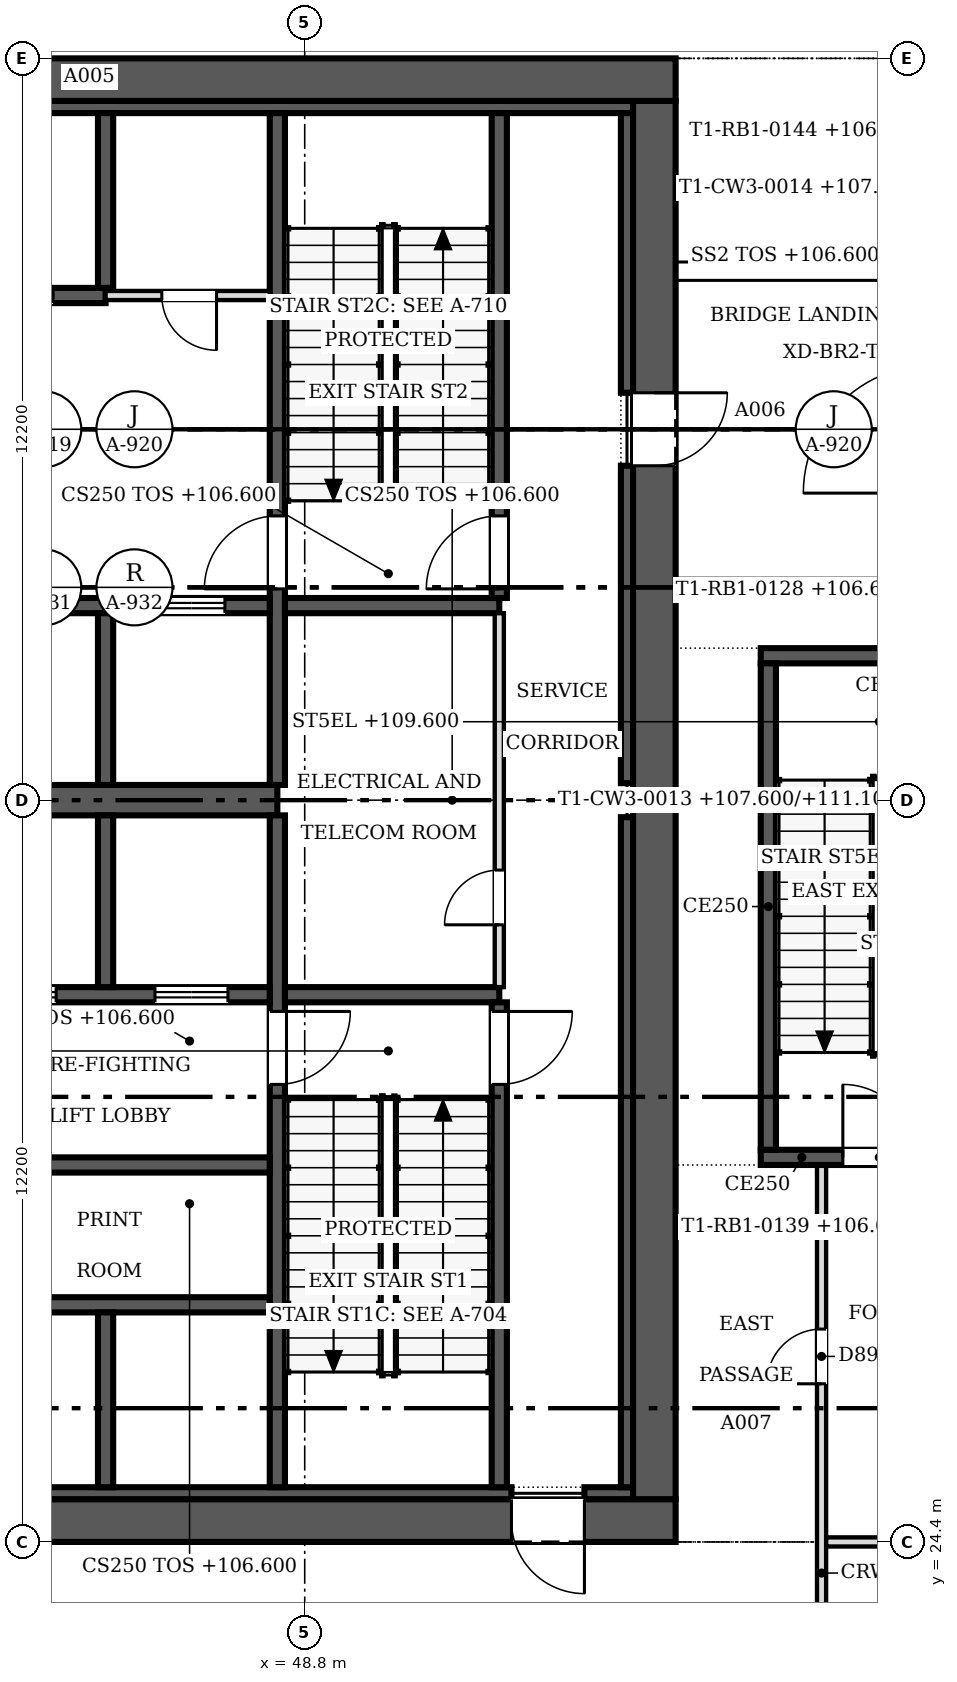
"""IFC4 building model, lengths in metres.
Left out: names, types, materials, properties, quantities, classifications, styles, units other than length and angle.
Written with IfcOpenShell. Run it as: python <this file> out.ifc"""

import sys

from ifc_helpers import new_model, si_unit, direction, frame, frame_2d, origin, place, context, subcontext, project, spatial, rectangle, extrude, source, transform, mapped, element, fill, save


model = new_model("IFC4")
c1 = context("Model", 3, precision=1e-05, world=origin(), true_north=direction((0.0, 1.0)))
c2 = subcontext(c1, "Body", "Model", "MODEL_VIEW")
j1 = project(units=[si_unit("LENGTHUNIT", "METRE"), si_unit("PLANEANGLEUNIT", "RADIAN")], contexts=[c1])
p1 = place(None, origin())
s1 = spatial("IfcSite", under=j1, at=p1, CompositionType="ELEMENT")
p2 = place(p1, origin())
s2 = spatial("IfcBuilding", under=s1, at=p2, CompositionType="ELEMENT")
p3 = place(p2, frame((0.0, 0.0, 106.6)))
s3 = spatial("IfcBuildingStorey", under=s2, at=p3, CompositionType="ELEMENT", Elevation=106.6)
p4 = place(p3, frame((54.9, 24.75, 0.0), z_axis=(0.0, 0.0, 1.0), x_axis=(-1.0, 0.0, 0.0)))
e1 = element("IfcWall", 1, at=p4, inside=s3, PredefinedType="SHEAR", context=c2, shape_type="SweptSolid", body=[
    extrude(rectangle(XDim=24.4, YDim=0.7, at=frame_2d((12.2, 0.0))), origin(), (0.0, 0.0, 1.0), 6.0),
])
m1 = source(origin(), c2, "Body", "SweptSolid", [
    extrude(rectangle(XDim=1.2, YDim=2.1, at=frame_2d((0.6, 1.05))), frame((0.0, 0.36, 0.0), z_axis=(0.0, -1.0, 0.0), x_axis=(1.0, 0.0, 0.0)), (0.0, 0.0, 1.0), 0.72),
])
p5 = place(p4, frame((1.5, 0.0, 0.0)))
e2 = element("IfcOpeningElement", 2, at=p5, cuts=e1, PredefinedType="OPENING", context=c2, shape_type="MappedRepresentation", body=[
    mapped(m1, transform((0.0, 0.0, 0.0), scale=1.0)),
])
p6 = place(p3, frame((30.5, 48.45, 0.0), z_axis=(0.0, 0.0, 1.0), x_axis=(1.0, 0.0, 0.0)))
e3 = element("IfcWall", 3, at=p6, inside=s3, PredefinedType="SHEAR", context=c2, shape_type="SweptSolid", body=[
    extrude(rectangle(XDim=24.4, YDim=0.7, at=frame_2d((12.2, 0.0))), origin(), (0.0, 0.0, 1.0), 6.0),
])
p7 = place(p3, frame((54.55, 48.1, 0.0), z_axis=(0.0, 0.0, 1.0), x_axis=(0.0, -1.0, 0.0)))
e4 = element("IfcWall", 4, at=p7, inside=s3, PredefinedType="SHEAR", context=c2, shape_type="SweptSolid", body=[
    extrude(rectangle(XDim=23.0, YDim=0.7, at=frame_2d((11.5, 0.0))), origin(), (0.0, 0.0, 1.0), 6.0),
])
p8 = place(p7, frame((4.8, 0.0, 0.0)))
e5 = element("IfcOpeningElement", 5, at=p8, cuts=e4, PredefinedType="OPENING", context=c2, shape_type="MappedRepresentation", body=[
    mapped(m1, transform((0.0, 0.0, 0.0), scale=1.0)),
])
p9 = place(p3, frame((31.2, 25.2, 0.0), z_axis=(0.0, 0.0, 1.0), x_axis=(1.0, 0.0, 0.0)))
e6 = element("IfcWall", 6, at=p9, inside=s3, PredefinedType="SOLIDWALL", context=c2, shape_type="SweptSolid", body=[
    extrude(rectangle(XDim=21.0, YDim=0.2, at=frame_2d((10.5, 0.0))), origin(), (0.0, 0.0, 1.0), 6.0),
])
p10 = place(p3, frame((53.4, 25.2, 0.0), z_axis=(0.0, 0.0, 1.0), x_axis=(1.0, 0.0, 0.0)))
e7 = element("IfcWall", 7, at=p10, inside=s3, PredefinedType="SOLIDWALL", context=c2, shape_type="SweptSolid", body=[
    extrude(rectangle(XDim=0.8, YDim=0.2, at=frame_2d((0.4, 0.0))), origin(), (0.0, 0.0, 1.0), 6.0),
])
p11 = place(p3, frame((31.2, 48.0, 0.0), z_axis=(0.0, 0.0, 1.0), x_axis=(1.0, 0.0, 0.0)))
e8 = element("IfcWall", 8, at=p11, inside=s3, PredefinedType="SOLIDWALL", context=c2, shape_type="SweptSolid", body=[
    extrude(rectangle(XDim=23.0, YDim=0.2, at=frame_2d((11.5, 0.0))), origin(), (0.0, 0.0, 1.0), 6.0),
])
p12 = place(p3, frame((54.1, 25.3, 0.0), z_axis=(0.0, 0.0, 1.0), x_axis=(0.0, 1.0, 0.0)))
e9 = element("IfcWall", 9, at=p12, inside=s3, PredefinedType="SOLIDWALL", context=c2, shape_type="SweptSolid", body=[
    extrude(rectangle(XDim=11.02, YDim=0.2, at=frame_2d((5.51, 0.0))), origin(), (0.0, 0.0, 1.0), 6.0),
])
p13 = place(p3, frame((54.1, 36.88, 0.0), z_axis=(0.0, 0.0, 1.0), x_axis=(0.0, 1.0, 0.0)))
e10 = element("IfcWall", 10, at=p13, inside=s3, PredefinedType="SOLIDWALL", context=c2, shape_type="SweptSolid", body=[
    extrude(rectangle(XDim=5.22, YDim=0.2, at=frame_2d((2.61, 0.0))), origin(), (0.0, 0.0, 1.0), 6.0),
])
p14 = place(p3, frame((54.1, 43.3, 0.0), z_axis=(0.0, 0.0, 1.0), x_axis=(0.0, 1.0, 0.0)))
e11 = element("IfcWall", 11, at=p14, inside=s3, PredefinedType="SOLIDWALL", context=c2, shape_type="SweptSolid", body=[
    extrude(rectangle(XDim=4.6, YDim=0.2, at=frame_2d((2.3, 0.0))), origin(), (0.0, 0.0, 1.0), 6.0),
])
p15 = place(p3, frame((31.4, 36.6, 0.0), z_axis=(0.0, 0.0, 1.0), x_axis=(1.0, 0.0, 0.0)))
e12 = element("IfcWall", 12, at=p15, inside=s3, PredefinedType="SHEAR", context=c2, shape_type="SweptSolid", body=[
    extrude(rectangle(XDim=16.95, YDim=0.5, at=frame_2d((8.475, 0.0))), origin(), (0.0, 0.0, 1.0), 6.0),
])
p16 = place(p3, frame((48.35, 36.35, 0.0), z_axis=(0.0, 0.0, 1.0), x_axis=(0.0, -1.0, 0.0)))
e13 = element("IfcWall", 13, at=p16, inside=s3, PredefinedType="SOLIDWALL", context=c2, shape_type="SweptSolid", body=[
    extrude(rectangle(XDim=11.05, YDim=0.25, at=frame_2d((5.525, 0.0))), origin(), (0.0, 0.0, 1.0), 6.0),
])
m2 = source(origin(), c2, "Body", "SweptSolid", [
    extrude(rectangle(XDim=1.2, YDim=2.1, at=frame_2d((0.6, 1.05))), frame((0.0, 0.135, 0.0), z_axis=(0.0, -1.0, 0.0), x_axis=(1.0, 0.0, 0.0)), (0.0, 0.0, 1.0), 0.27),
])
p17 = place(p16, frame((3.225, 0.0, 0.0)))
e14 = element("IfcOpeningElement", 14, at=p17, cuts=e13, PredefinedType="OPENING", context=c2, shape_type="MappedRepresentation", body=[
    mapped(m2, transform((0.0, 0.0, 0.0), scale=1.0)),
])
p18 = place(p3, frame((48.35, 47.9, 0.0), z_axis=(0.0, 0.0, 1.0), x_axis=(0.0, -1.0, 0.0)))
e15 = element("IfcWall", 15, at=p18, inside=s3, PredefinedType="SOLIDWALL", context=c2, shape_type="SweptSolid", body=[
    extrude(rectangle(XDim=11.05, YDim=0.25, at=frame_2d((5.525, 0.0))), origin(), (0.0, 0.0, 1.0), 6.0),
])
p19 = place(p18, frame((6.625, 0.0, 0.0)))
e16 = element("IfcOpeningElement", 16, at=p19, cuts=e15, PredefinedType="OPENING", context=c2, shape_type="MappedRepresentation", body=[
    mapped(m2, transform((0.0, 0.0, 0.0), scale=1.0)),
])
p20 = place(p3, frame((48.225, 33.4, 0.0), z_axis=(0.0, 0.0, 1.0), x_axis=(-1.0, 0.0, 0.0)))
e17 = element("IfcWall", 17, at=p20, inside=s3, PredefinedType="SOLIDWALL", context=c2, shape_type="SweptSolid", body=[
    extrude(rectangle(XDim=5.275, YDim=0.25, at=frame_2d((2.638, 0.0))), origin(), (0.0, 0.0, 1.0), 6.0),
])
p21 = place(p20, frame((3.512, 0.0, 0.0)))
e18 = element("IfcOpeningElement", 18, at=p21, cuts=e17, PredefinedType="OPENING", context=c2, shape_type="MappedRepresentation", body=[
    mapped(m2, transform((0.0, 0.0, 0.0), scale=1.0)),
])
p22 = place(p20, frame((0.688, 0.0, 0.0)))
e19 = element("IfcOpeningElement", 19, at=p22, cuts=e17, PredefinedType="OPENING", context=c2, shape_type="MappedRepresentation", body=[
    mapped(m2, transform((0.0, 0.0, 0.0), scale=1.0)),
])
p23 = place(p3, frame((48.475, 33.4, 0.0), z_axis=(0.0, 0.0, 1.0), x_axis=(1.0, 0.0, 0.0)))
e20 = element("IfcWall", 20, at=p23, inside=s3, PredefinedType="SOLIDWALL", context=c2, shape_type="SweptSolid", body=[
    extrude(rectangle(XDim=3.525, YDim=0.25, at=frame_2d((1.762, 0.0))), origin(), (0.0, 0.0, 1.0), 6.0),
])
p24 = place(p3, frame((42.95, 39.8, 0.0), z_axis=(0.0, 0.0, 1.0), x_axis=(1.0, 0.0, 0.0)))
e21 = element("IfcWall", 21, at=p24, inside=s3, PredefinedType="SOLIDWALL", context=c2, shape_type="SweptSolid", body=[
    extrude(rectangle(XDim=5.275, YDim=0.25, at=frame_2d((2.638, 0.0))), origin(), (0.0, 0.0, 1.0), 6.0),
])
m3 = source(origin(), c2, "Body", "SweptSolid", [
    extrude(rectangle(XDim=1.1, YDim=2.1, at=frame_2d((0.55, 1.05))), frame((0.0, 0.135, 0.0), z_axis=(0.0, -1.0, 0.0), x_axis=(1.0, 0.0, 0.0)), (0.0, 0.0, 1.0), 0.27),
])
p25 = place(p24, frame((0.613, 0.0, 0.0)))
e22 = element("IfcOpeningElement", 22, at=p25, cuts=e21, PredefinedType="OPENING", context=c2, shape_type="MappedRepresentation", body=[
    mapped(m3, transform((0.0, 0.0, 0.0), scale=1.0)),
])
p26 = place(p24, frame((3.438, 0.0, 0.0)))
e23 = element("IfcOpeningElement", 23, at=p26, cuts=e21, PredefinedType="OPENING", context=c2, shape_type="MappedRepresentation", body=[
    mapped(m3, transform((0.0, 0.0, 0.0), scale=1.0)),
])
p27 = place(p3, frame((48.475, 39.8, 0.0), z_axis=(0.0, 0.0, 1.0), x_axis=(1.0, 0.0, 0.0)))
e24 = element("IfcWall", 24, at=p27, inside=s3, PredefinedType="SOLIDWALL", context=c2, shape_type="SweptSolid", body=[
    extrude(rectangle(XDim=3.525, YDim=0.25, at=frame_2d((1.762, 0.0))), origin(), (0.0, 0.0, 1.0), 6.0),
])
p28 = place(p3, frame((42.95, 28.3, 0.0), z_axis=(0.0, 0.0, 1.0), x_axis=(1.0, 0.0, 0.0)))
e25 = element("IfcWall", 25, at=p28, inside=s3, PredefinedType="SOLIDWALL", context=c2, shape_type="SweptSolid", body=[
    extrude(rectangle(XDim=5.275, YDim=0.25, at=frame_2d((2.638, 0.0))), origin(), (0.0, 0.0, 1.0), 6.0),
])
p29 = place(p3, frame((45.525, 44.9, 0.0), z_axis=(0.0, 0.0, 1.0), x_axis=(-1.0, 0.0, 0.0)))
e26 = element("IfcWall", 26, at=p29, inside=s3, PredefinedType="SOLIDWALL", context=c2, shape_type="SweptSolid", body=[
    extrude(rectangle(XDim=2.575, YDim=0.25, at=frame_2d((1.288, 0.0))), origin(), (0.0, 0.0, 1.0), 6.0),
])
p30 = place(p29, frame((0.863, 0.0, 0.0)))
e27 = element("IfcOpeningElement", 27, at=p30, cuts=e26, PredefinedType="OPENING", context=c2, shape_type="MappedRepresentation", body=[
    mapped(m3, transform((0.0, 0.0, 0.0), scale=1.0)),
])
p31 = place(p3, frame((52.0, 25.3, 0.0), z_axis=(0.0, 0.0, 1.0), x_axis=(0.0, 1.0, 0.0)))
e28 = element("IfcWall", 28, at=p31, inside=s3, PredefinedType="SOLIDWALL", context=c2, shape_type="SweptSolid", body=[
    extrude(rectangle(XDim=7.975, YDim=0.25, at=frame_2d((3.987, 0.0))), origin(), (0.0, 0.0, 1.0), 6.0),
])
p32 = place(p31, frame((6.625, 0.0, 0.0)))
e29 = element("IfcOpeningElement", 29, at=p32, cuts=e28, PredefinedType="OPENING", context=c2, shape_type="MappedRepresentation", body=[
    mapped(m2, transform((0.0, 0.0, 0.0), scale=1.0)),
])
p33 = place(p3, frame((52.0, 39.925, 0.0), z_axis=(0.0, 0.0, 1.0), x_axis=(0.0, 1.0, 0.0)))
e30 = element("IfcWall", 30, at=p33, inside=s3, PredefinedType="SOLIDWALL", context=c2, shape_type="SweptSolid", body=[
    extrude(rectangle(XDim=7.975, YDim=0.25, at=frame_2d((3.987, 0.0))), origin(), (0.0, 0.0, 1.0), 6.0),
])
p34 = place(p33, frame((0.15, 0.0, 0.0)))
e31 = element("IfcOpeningElement", 31, at=p34, cuts=e30, PredefinedType="OPENING", context=c2, shape_type="MappedRepresentation", body=[
    mapped(m2, transform((0.0, 0.0, 0.0), scale=1.0)),
])
p35 = place(p3, frame((45.525, 33.525, 0.0), z_axis=(0.0, 0.0, 1.0), x_axis=(0.0, 1.0, 0.0)))
e32 = element("IfcWall", 32, at=p35, inside=s3, PredefinedType="SOLIDWALL", context=c2, shape_type="SweptSolid", body=[
    extrude(rectangle(XDim=2.825, YDim=0.25, at=frame_2d((1.413, 0.0))), origin(), (0.0, 0.0, 1.0), 6.0),
])
p36 = place(p3, frame((45.525, 36.85, 0.0), z_axis=(0.0, 0.0, 1.0), x_axis=(0.0, 1.0, 0.0)))
e33 = element("IfcWall", 33, at=p36, inside=s3, PredefinedType="SOLIDWALL", context=c2, shape_type="SweptSolid", body=[
    extrude(rectangle(XDim=2.825, YDim=0.25, at=frame_2d((1.413, 0.0))), origin(), (0.0, 0.0, 1.0), 6.0),
])
p37 = place(p3, frame((42.95, 30.6, 0.0), z_axis=(0.0, 0.0, 1.0), x_axis=(1.0, 0.0, 0.0)))
e34 = element("IfcWall", 34, at=p37, inside=s3, PredefinedType="SOLIDWALL", context=c2, shape_type="SweptSolid", body=[
    extrude(rectangle(XDim=5.275, YDim=0.25, at=frame_2d((2.638, 0.0))), origin(), (0.0, 0.0, 1.0), 6.0),
])
for number, where, z_axis, x_axis in (
    (35, (45.525, 25.3, 0.0), (0.0, 0.0, 1.0), (0.0, 1.0, 0.0)),
    (36, (45.525, 45.025, 0.0), (0.0, 0.0, 1.0), (0.0, 1.0, 0.0)),
):
    element("IfcWall", number, at=place(p3, frame(where, z_axis=z_axis, x_axis=x_axis)), inside=s3, PredefinedType="SOLIDWALL", context=c2, shape_type="SweptSolid", body=[
        extrude(rectangle(XDim=2.875, YDim=0.25, at=frame_2d((1.438, 0.0))), origin(), (0.0, 0.0, 1.0), 6.0),
    ])
p38 = place(p3, frame((52.0, 33.525, 0.0), z_axis=(0.0, 0.0, 1.0), x_axis=(0.0, 1.0, 0.0)))
e37 = element("IfcWall", 37, at=p38, inside=s3, PredefinedType="PARTITIONING", context=c2, shape_type="SweptSolid", body=[
    extrude(rectangle(XDim=6.15, YDim=0.15, at=frame_2d((3.075, 0.0))), origin(), (0.0, 0.0, 1.0), 5.8),
])
m4 = source(origin(), c2, "Body", "SweptSolid", [
    extrude(rectangle(XDim=0.9, YDim=2.1, at=frame_2d((0.45, 1.05))), frame((0.0, 0.085, 0.0), z_axis=(0.0, -1.0, 0.0), x_axis=(1.0, 0.0, 0.0)), (0.0, 0.0, 1.0), 0.17),
])
p39 = place(p38, frame((1.025, 0.0, 0.0)))
e38 = element("IfcOpeningElement", 38, at=p39, cuts=e37, PredefinedType="OPENING", context=c2, shape_type="MappedRepresentation", body=[
    mapped(m4, transform((0.0, 0.0, 0.0), scale=1.0)),
])
p40 = place(p3, frame((45.525, 44.9, 0.0), z_axis=(0.0, 0.0, 1.0), x_axis=(1.0, 0.0, 0.0)))
e39 = element("IfcWall", 39, at=p40, inside=s3, PredefinedType="PARTITIONING", context=c2, shape_type="SweptSolid", body=[
    extrude(rectangle(XDim=2.7, YDim=0.15, at=frame_2d((1.35, 0.0))), origin(), (0.0, 0.0, 1.0), 5.8),
])
p41 = place(p40, frame((0.925, 0.0, 0.0)))
e40 = element("IfcOpeningElement", 40, at=p41, cuts=e39, PredefinedType="OPENING", context=c2, shape_type="MappedRepresentation", body=[
    mapped(m4, transform((0.0, 0.0, 0.0), scale=1.0)),
])
p42 = place(p3, frame((60.5, 30.725, 0.0), z_axis=(0.0, 0.0, 1.0), x_axis=(-1.0, 0.0, 0.0)))
e41 = element("IfcWall", 41, at=p42, inside=s3, PredefinedType="SOLIDWALL", context=c2, shape_type="SweptSolid", body=[
    extrude(rectangle(XDim=4.2, YDim=0.25, at=frame_2d((2.1, 0.0))), origin(), (0.0, 0.0, 1.0), 6.0),
])
p43 = place(p42, frame((1.65, 0.0, 0.0)))
e42 = element("IfcOpeningElement", 42, at=p43, cuts=e41, PredefinedType="OPENING", context=c2, shape_type="MappedRepresentation", body=[
    mapped(m2, transform((0.0, 0.0, 0.0), scale=1.0)),
])
p44 = place(p3, frame((56.425, 30.85, 0.0), z_axis=(0.0, 0.0, 1.0), x_axis=(0.0, 1.0, 0.0)))
e43 = element("IfcWall", 43, at=p44, inside=s3, PredefinedType="SOLIDWALL", context=c2, shape_type="SweptSolid", body=[
    extrude(rectangle(XDim=8.0, YDim=0.25, at=frame_2d((4.0, 0.0))), origin(), (0.0, 0.0, 1.0), 6.0),
])
p45 = place(p3, frame((56.3, 38.975, 0.0), z_axis=(0.0, 0.0, 1.0), x_axis=(1.0, 0.0, 0.0)))
e44 = element("IfcWall", 44, at=p45, inside=s3, PredefinedType="SOLIDWALL", context=c2, shape_type="SweptSolid", body=[
    extrude(rectangle(XDim=4.2, YDim=0.25, at=frame_2d((2.1, 0.0))), origin(), (0.0, 0.0, 1.0), 6.0),
])
p46 = place(p3, frame((57.3, 30.6, 0.0), z_axis=(0.0, 0.0, 1.0), x_axis=(0.0, -1.0, 0.0)))
e45 = element("IfcWall", 45, at=p46, inside=s3, PredefinedType="PARTITIONING", context=c2, shape_type="SweptSolid", body=[
    extrude(rectangle(XDim=14.324, YDim=0.15, at=frame_2d((7.162, 0.0))), origin(), (0.0, 0.0, 1.0), 5.167),
])
p47 = place(p46, frame((2.699, 0.0, 0.0)))
e46 = element("IfcOpeningElement", 46, at=p47, cuts=e45, PredefinedType="OPENING", context=c2, shape_type="MappedRepresentation", body=[
    mapped(m4, transform((0.0, 0.0, 0.0), scale=1.0)),
])
p48 = place(p46, frame((9.824, 0.0, 0.0)))
e47 = element("IfcOpeningElement", 47, at=p48, cuts=e45, PredefinedType="OPENING", context=c2, shape_type="MappedRepresentation", body=[
    mapped(m4, transform((0.0, 0.0, 0.0), scale=1.0)),
])
p49 = place(p3, frame((57.376, 24.4, 0.0), z_axis=(0.0, 0.0, 1.0), x_axis=(1.0, 0.0, 0.0)))
e48 = element("IfcWall", 48, at=p49, inside=s3, PredefinedType="PARTITIONING", context=c2, shape_type="SweptSolid", body=[
    extrude(rectangle(XDim=3.124, YDim=0.15, at=frame_2d((1.562, 0.0))), origin(), (0.0, 0.0, 1.0), 5.167),
])
m5 = source(origin(), c2, "Body", "SweptSolid", [
    extrude(rectangle(XDim=1.2, YDim=2.1, at=frame_2d((0.6, 1.05))), frame((0.0, 0.025, 0.0), z_axis=(0.0, -1.0, 0.0), x_axis=(1.0, 0.0, 0.0)), (0.0, 0.0, 1.0), 0.05),
])
p50 = place(p5, origin())
e49 = element("IfcDoor", 49, at=p50, inside=s3, OperationType="SINGLE_SWING_LEFT", PredefinedType="DOOR", context=c2, shape_type="MappedRepresentation", body=[
    mapped(m5, transform((0.0, 0.0, 0.0), scale=1.0)),
])
fill(e2, e49)
p51 = place(p8, origin())
e50 = element("IfcDoor", 50, at=p51, inside=s3, OperationType="SINGLE_SWING_LEFT", PredefinedType="DOOR", context=c2, shape_type="MappedRepresentation", body=[
    mapped(m5, transform((0.0, 0.0, 0.0), scale=1.0)),
])
fill(e5, e50)
p52 = place(p17, origin())
e51 = element("IfcDoor", 51, at=p52, inside=s3, OperationType="SINGLE_SWING_LEFT", PredefinedType="DOOR", context=c2, shape_type="MappedRepresentation", body=[
    mapped(m5, transform((0.0, 0.0, 0.0), scale=1.0)),
])
fill(e14, e51)
p53 = place(p19, origin())
e52 = element("IfcDoor", 52, at=p53, inside=s3, OperationType="SINGLE_SWING_RIGHT", PredefinedType="DOOR", context=c2, shape_type="MappedRepresentation", body=[
    mapped(m5, transform((0.0, 0.0, 0.0), scale=1.0)),
])
fill(e16, e52)
p54 = place(p21, origin())
e53 = element("IfcDoor", 53, at=p54, inside=s3, OperationType="DOUBLE_DOOR_SLIDING", PredefinedType="DOOR", context=c2, shape_type="MappedRepresentation", body=[
    mapped(m5, transform((0.0, 0.0, 0.0), scale=1.0)),
])
fill(e18, e53)
p55 = place(p22, origin())
e54 = element("IfcDoor", 54, at=p55, inside=s3, OperationType="DOUBLE_DOOR_SLIDING", PredefinedType="DOOR", context=c2, shape_type="MappedRepresentation", body=[
    mapped(m5, transform((0.0, 0.0, 0.0), scale=1.0)),
])
fill(e19, e54)
m6 = source(origin(), c2, "Body", "SweptSolid", [
    extrude(rectangle(XDim=1.1, YDim=2.1, at=frame_2d((0.55, 1.05))), frame((0.0, 0.025, 0.0), z_axis=(0.0, -1.0, 0.0), x_axis=(1.0, 0.0, 0.0)), (0.0, 0.0, 1.0), 0.05),
])
p56 = place(p25, origin())
e55 = element("IfcDoor", 55, at=p56, inside=s3, OperationType="DOUBLE_DOOR_SLIDING", PredefinedType="DOOR", context=c2, shape_type="MappedRepresentation", body=[
    mapped(m6, transform((0.0, 0.0, 0.0), scale=1.0)),
])
fill(e22, e55)
p57 = place(p26, origin())
e56 = element("IfcDoor", 56, at=p57, inside=s3, OperationType="DOUBLE_DOOR_SLIDING", PredefinedType="DOOR", context=c2, shape_type="MappedRepresentation", body=[
    mapped(m6, transform((0.0, 0.0, 0.0), scale=1.0)),
])
fill(e23, e56)
p58 = place(p30, origin())
e57 = element("IfcDoor", 57, at=p58, inside=s3, OperationType="DOUBLE_DOOR_SLIDING", PredefinedType="DOOR", context=c2, shape_type="MappedRepresentation", body=[
    mapped(m6, transform((0.0, 0.0, 0.0), scale=1.0)),
])
fill(e27, e57)
p59 = place(p32, origin())
e58 = element("IfcDoor", 58, at=p59, inside=s3, OperationType="SINGLE_SWING_RIGHT", PredefinedType="DOOR", context=c2, shape_type="MappedRepresentation", body=[
    mapped(m5, transform((0.0, 0.0, 0.0), scale=1.0)),
])
fill(e29, e58)
p60 = place(p34, origin())
e59 = element("IfcDoor", 59, at=p60, inside=s3, OperationType="SINGLE_SWING_LEFT", PredefinedType="DOOR", context=c2, shape_type="MappedRepresentation", body=[
    mapped(m5, transform((0.0, 0.0, 0.0), scale=1.0)),
])
fill(e31, e59)
m7 = source(origin(), c2, "Body", "SweptSolid", [
    extrude(rectangle(XDim=0.9, YDim=2.1, at=frame_2d((0.45, 1.05))), frame((0.0, 0.025, 0.0), z_axis=(0.0, -1.0, 0.0), x_axis=(1.0, 0.0, 0.0)), (0.0, 0.0, 1.0), 0.05),
])
p61 = place(p39, origin())
e60 = element("IfcDoor", 60, at=p61, inside=s3, OperationType="SINGLE_SWING_LEFT", PredefinedType="DOOR", context=c2, shape_type="MappedRepresentation", body=[
    mapped(m7, transform((0.0, 0.0, 0.0), scale=1.0)),
])
fill(e38, e60)
p62 = place(p41, origin())
e61 = element("IfcDoor", 61, at=p62, inside=s3, OperationType="SINGLE_SWING_RIGHT", PredefinedType="DOOR", context=c2, shape_type="MappedRepresentation", body=[
    mapped(m7, transform((0.0, 0.0, 0.0), scale=1.0)),
])
fill(e40, e61)
p63 = place(p43, origin())
e62 = element("IfcDoor", 62, at=p63, inside=s3, OperationType="SINGLE_SWING_RIGHT", PredefinedType="DOOR", context=c2, shape_type="MappedRepresentation", body=[
    mapped(m5, transform((0.0, 0.0, 0.0), scale=1.0)),
])
fill(e42, e62)
p64 = place(p47, origin())
e63 = element("IfcDoor", 63, at=p64, inside=s3, OperationType="SINGLE_SWING_RIGHT", PredefinedType="DOOR", context=c2, shape_type="MappedRepresentation", body=[
    mapped(m7, transform((0.0, 0.0, 0.0), scale=1.0)),
])
fill(e46, e63)
save(model, sys.argv[1])
